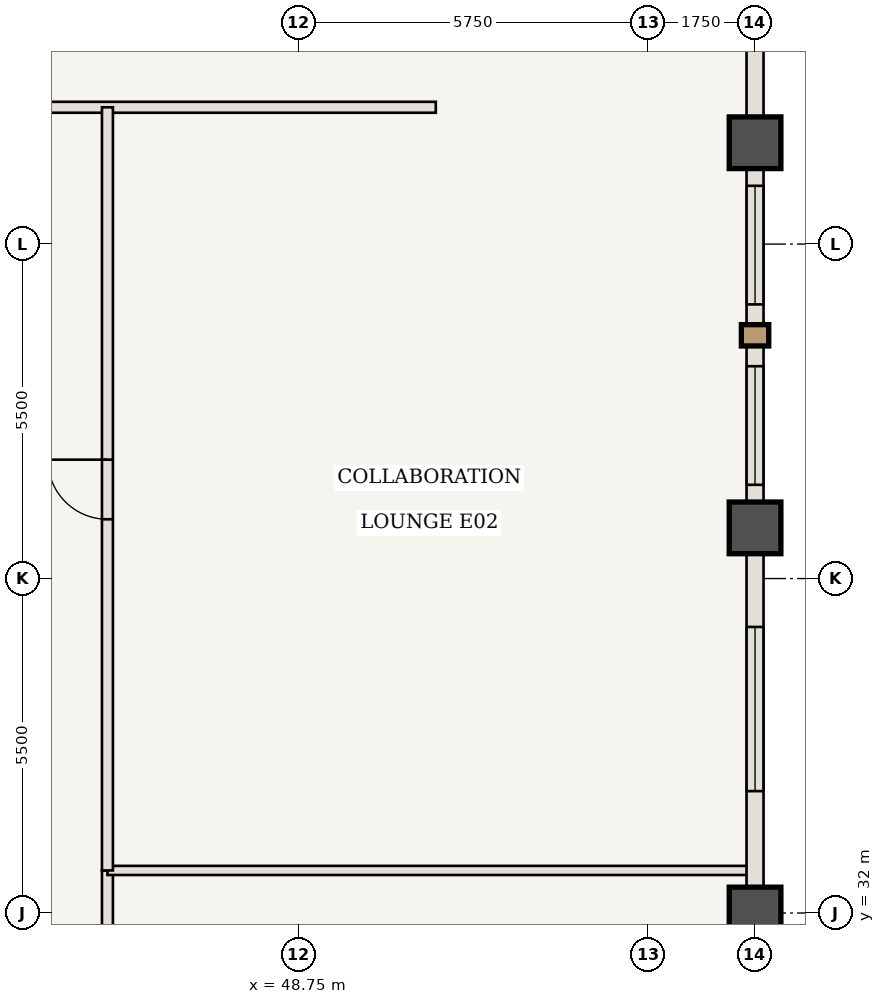
"""IFC4 building model, lengths in metres.
Left out: names, types, materials, properties, quantities, classifications, styles, units other than length and angle.
Written with IfcOpenShell. Run it as: python <this file> out.ifc"""

import sys

from ifc_helpers import new_model, si_unit, direction, frame, frame_2d, origin, origin_2d, place, context, subcontext, project, spatial, rectangle, extrude, element, fill, save


model = new_model("IFC4")
c1 = context("Model", 3, precision=1e-05, world=origin(), true_north=direction((0.0, 1.0)))
c2 = subcontext(c1, "Body", "Model", "MODEL_VIEW")
j1 = project(units=[si_unit("LENGTHUNIT", "METRE"), si_unit("PLANEANGLEUNIT", "RADIAN")], contexts=[c1])
p1 = place(None, origin())
s1 = spatial("IfcSite", under=j1, at=p1, CompositionType="ELEMENT")
p2 = place(p1, origin())
s2 = spatial("IfcBuilding", under=s1, at=p2, CompositionType="ELEMENT")
p3 = place(p2, frame((0.0, 0.0, 233.1)))
s3 = spatial("IfcBuildingStorey", under=s2, at=p3, CompositionType="ELEMENT", Elevation=233.1)
for number, where, z_axis, x_axis in (
    (1, (56.25, 32.0, 0.0), (0.0, 0.0, 1.0), (1.0, 0.0, 0.0)),
    (2, (56.25, 38.333, 0.0), (0.0, 0.0, 1.0), (1.0, 0.0, 0.0)),
    (3, (56.25, 44.667, 0.0), (0.0, 0.0, 1.0), (1.0, 0.0, 0.0)),
):
    element("IfcColumn", number, at=place(p3, frame(where, z_axis=z_axis, x_axis=x_axis)), inside=s3, PredefinedType="COLUMN", context=c2, shape_type="SweptSolid", body=[
        extrude(rectangle(XDim=0.85, YDim=0.85, at=origin_2d()), origin(), (0.0, 0.0, 1.0), 3.85),
    ])
p4 = place(p3, frame((32.6, 45.25, 0.0), z_axis=(0.0, 0.0, 1.0), x_axis=(1.0, 0.0, 0.0)))
e4 = element("IfcWall", 4, at=p4, inside=s3, PredefinedType="STANDARD", context=c2, shape_type="SweptSolid", body=[
    extrude(rectangle(XDim=18.4, YDim=0.18, at=frame_2d((9.2, 0.0))), origin(), (0.0, 0.0, 1.0), 3.685),
])
p5 = place(p4, frame((5.975, 0.0, 0.0)))
e5 = element("IfcOpeningElement", 5, at=p5, cuts=e4, PredefinedType="OPENING", context=c2, shape_type="SweptSolid", body=[
    extrude(rectangle(XDim=0.98, YDim=2.2, at=frame_2d((0.49, 1.1))), frame((0.0, 0.1, 0.0), z_axis=(0.0, -1.0, 0.0), x_axis=(1.0, 0.0, 0.0)), (0.0, 0.0, 1.0), 0.2),
])
p6 = place(p3, frame((45.6, 18.75, 0.0), z_axis=(0.0, 0.0, 1.0), x_axis=(0.0, 1.0, 0.0)))
e6 = element("IfcWall", 6, at=p6, inside=s3, PredefinedType="STANDARD", context=c2, shape_type="SweptSolid", body=[
    extrude(rectangle(XDim=13.95, YDim=0.18, at=frame_2d((6.975, 0.0))), origin(), (0.0, 0.0, 1.0), 3.685),
])
p7 = place(p6, frame((6.475, 0.0, 0.0)))
e7 = element("IfcOpeningElement", 7, at=p7, cuts=e6, PredefinedType="OPENING", context=c2, shape_type="SweptSolid", body=[
    extrude(rectangle(XDim=0.98, YDim=2.2, at=frame_2d((0.49, 1.1))), frame((0.0, 0.1, 0.0), z_axis=(0.0, -1.0, 0.0), x_axis=(1.0, 0.0, 0.0)), (0.0, 0.0, 1.0), 0.2),
])
p8 = place(p3, frame((45.6, 32.7, 0.0), z_axis=(0.0, 0.0, 1.0), x_axis=(1.0, 0.0, 0.0)))
e8 = element("IfcWall", 8, at=p8, inside=s3, PredefinedType="STANDARD", context=c2, shape_type="SweptSolid", body=[
    extrude(rectangle(XDim=10.59, YDim=0.15, at=frame_2d((5.295, 0.0))), origin(), (0.0, 0.0, 1.0), 3.685),
])
p9 = place(p3, frame((45.6, 32.7, 0.0), z_axis=(0.0, 0.0, 1.0), x_axis=(0.0, 1.0, 0.0)))
e9 = element("IfcWall", 9, at=p9, inside=s3, PredefinedType="STANDARD", context=c2, shape_type="SweptSolid", body=[
    extrude(rectangle(XDim=12.55, YDim=0.18, at=frame_2d((6.275, 0.0))), origin(), (0.0, 0.0, 1.0), 3.685),
])
p10 = place(p9, frame((5.775, 0.0, 0.0)))
e10 = element("IfcOpeningElement", 10, at=p10, cuts=e9, PredefinedType="OPENING", context=c2, shape_type="SweptSolid", body=[
    extrude(rectangle(XDim=0.98, YDim=2.2, at=frame_2d((0.49, 1.1))), frame((0.0, 0.1, 0.0), z_axis=(0.0, -1.0, 0.0), x_axis=(1.0, 0.0, 0.0)), (0.0, 0.0, 1.0), 0.2),
])
p11 = place(p3, frame((56.25, 32.0, 0.0), z_axis=(0.0, 0.0, 1.0), x_axis=(0.0, -1.0, 0.0)))
e11 = element("IfcWall", 11, at=p11, inside=s3, PredefinedType="USERDEFINED", context=c2, shape_type="SweptSolid", body=[
    extrude(rectangle(XDim=6.333, YDim=0.28, at=frame_2d((3.167, 0.0))), origin(), (0.0, 0.0, 1.0), 2.985),
])
p12 = place(p11, frame((1.817, 0.0, 0.85)))
e12 = element("IfcOpeningElement", 12, at=p12, cuts=e11, PredefinedType="OPENING", context=c2, shape_type="SweptSolid", body=[
    extrude(rectangle(XDim=2.7, YDim=1.935, at=frame_2d((1.35, 0.968))), frame((0.0, 0.15, 0.0), z_axis=(0.0, -1.0, 0.0), x_axis=(1.0, 0.0, 0.0)), (0.0, 0.0, 1.0), 0.3),
])
p13 = place(p3, frame((56.25, 38.333, 0.0), z_axis=(0.0, 0.0, 1.0), x_axis=(0.0, -1.0, 0.0)))
e13 = element("IfcWall", 13, at=p13, inside=s3, PredefinedType="USERDEFINED", context=c2, shape_type="SweptSolid", body=[
    extrude(rectangle(XDim=6.333, YDim=0.28, at=frame_2d((3.167, 0.0))), origin(), (0.0, 0.0, 1.0), 2.985),
])
p14 = place(p13, frame((1.629, 0.0, 0.85)))
e14 = element("IfcOpeningElement", 14, at=p14, cuts=e13, PredefinedType="OPENING", context=c2, shape_type="SweptSolid", body=[
    extrude(rectangle(XDim=2.7, YDim=1.935, at=frame_2d((1.35, 0.968))), frame((0.0, 0.15, 0.0), z_axis=(0.0, -1.0, 0.0), x_axis=(1.0, 0.0, 0.0)), (0.0, 0.0, 1.0), 0.3),
])
p15 = place(p3, frame((56.25, 44.667, 0.0), z_axis=(0.0, 0.0, 1.0), x_axis=(0.0, -1.0, 0.0)))
e15 = element("IfcWall", 15, at=p15, inside=s3, PredefinedType="USERDEFINED", context=c2, shape_type="SweptSolid", body=[
    extrude(rectangle(XDim=6.333, YDim=0.28, at=frame_2d((3.167, 0.0))), origin(), (0.0, 0.0, 1.0), 2.985),
])
p16 = place(p15, frame((0.708, 0.0, 0.85)))
e16 = element("IfcOpeningElement", 16, at=p16, cuts=e15, PredefinedType="OPENING", context=c2, shape_type="SweptSolid", body=[
    extrude(rectangle(XDim=1.95, YDim=1.935, at=frame_2d((0.975, 0.968))), frame((0.0, 0.15, 0.0), z_axis=(0.0, -1.0, 0.0), x_axis=(1.0, 0.0, 0.0)), (0.0, 0.0, 1.0), 0.3),
])
p17 = place(p15, frame((3.675, 0.0, 0.85)))
e17 = element("IfcOpeningElement", 17, at=p17, cuts=e15, PredefinedType="OPENING", context=c2, shape_type="SweptSolid", body=[
    extrude(rectangle(XDim=1.95, YDim=1.935, at=frame_2d((0.975, 0.968))), frame((0.0, 0.15, 0.0), z_axis=(0.0, -1.0, 0.0), x_axis=(1.0, 0.0, 0.0)), (0.0, 0.0, 1.0), 0.3),
])
p18 = place(p3, frame((56.25, 51.0, 0.0), z_axis=(0.0, 0.0, 1.0), x_axis=(0.0, -1.0, 0.0)))
e18 = element("IfcWall", 18, at=p18, inside=s3, PredefinedType="USERDEFINED", context=c2, shape_type="SweptSolid", body=[
    extrude(rectangle(XDim=6.333, YDim=0.28, at=frame_2d((3.167, 0.0))), origin(), (0.0, 0.0, 1.0), 2.985),
])
p19 = place(p10, origin())
e19 = element("IfcDoor", 19, at=p19, inside=s3, OperationType="SINGLE_SWING_RIGHT", PredefinedType="DOOR", context=c2, shape_type="SweptSolid", body=[
    extrude(rectangle(XDim=0.98, YDim=2.2, at=frame_2d((0.49, 1.1))), frame((0.0, 0.025, 0.0), z_axis=(0.0, -1.0, 0.0), x_axis=(1.0, 0.0, 0.0)), (0.0, 0.0, 1.0), 0.05),
])
fill(e10, e19)
p20 = place(p14, origin())
e20 = element("IfcWindow", 20, at=p20, inside=s3, PartitioningType="SINGLE_PANEL", PredefinedType="WINDOW", context=c2, shape_type="SweptSolid", body=[
    extrude(rectangle(XDim=2.7, YDim=1.935, at=frame_2d((1.35, 0.968))), frame((0.0, 0.03, 0.0), z_axis=(0.0, -1.0, 0.0), x_axis=(1.0, 0.0, 0.0)), (0.0, 0.0, 1.0), 0.06),
])
fill(e14, e20)
p21 = place(p16, origin())
e21 = element("IfcWindow", 21, at=p21, inside=s3, PartitioningType="SINGLE_PANEL", PredefinedType="WINDOW", context=c2, shape_type="SweptSolid", body=[
    extrude(rectangle(XDim=1.95, YDim=1.935, at=frame_2d((0.975, 0.968))), frame((0.0, 0.03, 0.0), z_axis=(0.0, -1.0, 0.0), x_axis=(1.0, 0.0, 0.0)), (0.0, 0.0, 1.0), 0.06),
])
fill(e16, e21)
p22 = place(p17, origin())
e22 = element("IfcWindow", 22, at=p22, inside=s3, PartitioningType="SINGLE_PANEL", PredefinedType="WINDOW", context=c2, shape_type="SweptSolid", body=[
    extrude(rectangle(XDim=1.95, YDim=1.935, at=frame_2d((0.975, 0.968))), frame((0.0, 0.03, 0.0), z_axis=(0.0, -1.0, 0.0), x_axis=(1.0, 0.0, 0.0)), (0.0, 0.0, 1.0), 0.06),
])
fill(e17, e22)
save(model, sys.argv[1])
